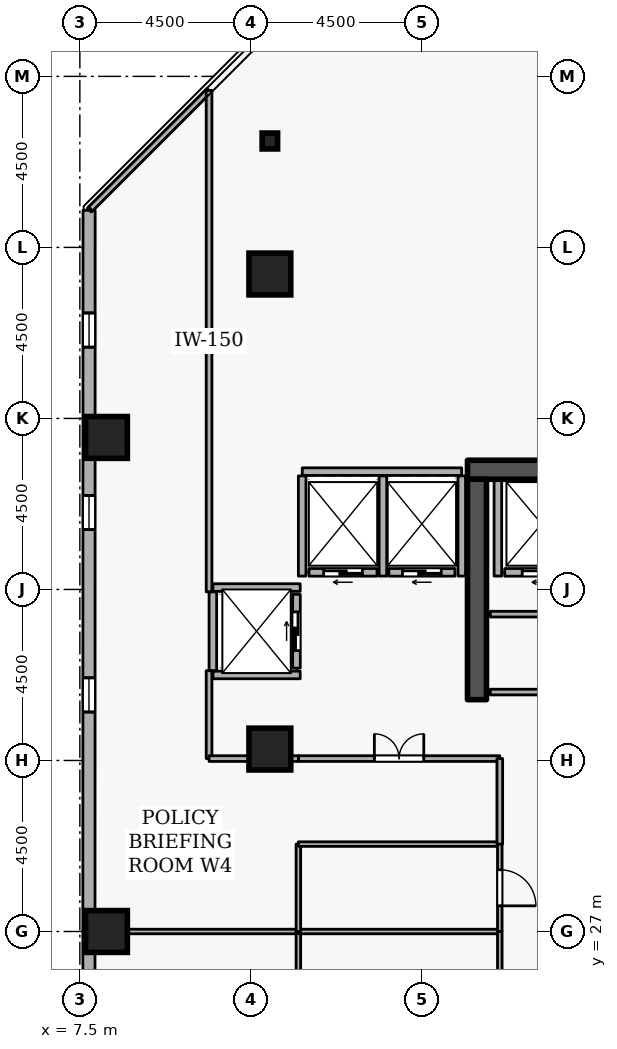
"""IFC4 building model, lengths in metres.
Left out: names, types, materials, properties, quantities, classifications, styles, units other than length and angle.
Written with IfcOpenShell. Run it as: python <this file> out.ifc"""

import sys

from ifc_helpers import new_model, si_unit, direction, frame, frame_2d, origin, origin_2d, place, context, subcontext, project, spatial, rectangle, i_section, extrude, element, fill, save


model = new_model("IFC4")
c1 = context("Model", 3, precision=1e-05, world=origin(), true_north=direction((0.0, 1.0)))
c2 = subcontext(c1, "Body", "Model", "MODEL_VIEW")
j1 = project(units=[si_unit("LENGTHUNIT", "METRE"), si_unit("PLANEANGLEUNIT", "RADIAN")], contexts=[c1])
p1 = place(None, origin())
s1 = spatial("IfcSite", under=j1, at=p1, CompositionType="ELEMENT")
p2 = place(p1, origin())
s2 = spatial("IfcBuilding", under=s1, at=p2, CompositionType="ELEMENT")
p3 = place(p2, frame((0.0, 0.0, 192.9)))
s3 = spatial("IfcBuildingStorey", under=s2, at=p3, CompositionType="ELEMENT", Elevation=192.9)
p4 = place(p3, frame((17.7, 39.15, 0.0), z_axis=(0.0, 0.0, 1.0), x_axis=(1.0, 0.0, 0.0)))
e1 = element("IfcWall", 1, at=p4, inside=s3, PredefinedType="SHEAR", context=c2, shape_type="SweptSolid", body=[
    extrude(rectangle(XDim=15.6, YDim=0.5, at=frame_2d((7.8, 0.0))), origin(), (0.0, 0.0, 1.0), 3.6),
])
p5 = place(p3, frame((17.95, 33.1, 0.0), z_axis=(0.0, 0.0, 1.0), x_axis=(0.0, 1.0, 0.0)))
e2 = element("IfcWall", 2, at=p5, inside=s3, PredefinedType="SHEAR", context=c2, shape_type="SweptSolid", body=[
    extrude(rectangle(XDim=5.8, YDim=0.5, at=frame_2d((2.9, 0.0))), origin(), (0.0, 0.0, 1.0), 3.6),
])
for number, where, z_axis, x_axis in (
    (3, (12.5, 44.3, 0.0), (0.0, 0.0, 1.0), (1.0, 0.0, 0.0)),
    (4, (8.2, 27.0, 0.0), (0.0, 0.0, 1.0), (1.0, 0.0, 0.0)),
    (5, (8.2, 40.0, 0.0), (0.0, 0.0, 1.0), (1.0, 0.0, 0.0)),
    (6, (12.5, 31.8, 0.0), (0.0, 0.0, 1.0), (1.0, 0.0, 0.0)),
):
    element("IfcColumn", number, at=place(p3, frame(where, z_axis=z_axis, x_axis=x_axis)), inside=s3, PredefinedType="COLUMN", context=c2, shape_type="SweptSolid", body=[
        extrude(rectangle(XDim=1.1, YDim=1.1, at=origin_2d()), origin(), (0.0, 0.0, 1.0), 3.6),
    ])
p6 = place(p3, frame((12.5, 47.8, 0.0), z_axis=(0.0, 0.0, 1.0), x_axis=(1.0, 0.0, 0.0)))
e7 = element("IfcColumn", 7, at=p6, inside=s3, PredefinedType="COLUMN", context=c2, shape_type="SweptSolid", body=[
    extrude(i_section(OverallWidth=0.407, OverallDepth=0.419, WebThickness=0.031, FlangeThickness=0.049, FilletRadius=0.015, at=origin_2d()), origin(), (0.0, 0.0, 1.0), 3.6),
])
p7 = place(p3, frame((7.743, 45.975, 0.0), z_axis=(0.0, 0.0, 1.0), x_axis=(-0.000214431216, -0.99999997701, 0.0)))
e8 = element("IfcWall", 8, at=p7, inside=s3, PredefinedType="STANDARD", context=c2, shape_type="SweptSolid", body=[
    extrude(rectangle(XDim=34.156, YDim=0.32, at=frame_2d((17.078, 0.0))), origin(), (0.0, 0.0, 1.0), 2.7),
])
p8 = place(p7, frame((2.7, 0.0, 0.72)))
e9 = element("IfcOpeningElement", 9, at=p8, cuts=e8, PredefinedType="OPENING", context=c2, shape_type="SweptSolid", body=[
    extrude(rectangle(XDim=0.9, YDim=1.75, at=frame_2d((0.45, 0.875))), frame((0.0, 0.17, 0.0), z_axis=(0.0, -1.0, 0.0), x_axis=(1.0, 0.0, 0.0)), (0.0, 0.0, 1.0), 0.34),
])
p9 = place(p7, frame((7.5, 0.0, 0.72)))
e10 = element("IfcOpeningElement", 10, at=p9, cuts=e8, PredefinedType="OPENING", context=c2, shape_type="SweptSolid", body=[
    extrude(rectangle(XDim=0.9, YDim=1.75, at=frame_2d((0.45, 0.875))), frame((0.0, 0.17, 0.0), z_axis=(0.0, -1.0, 0.0), x_axis=(1.0, 0.0, 0.0)), (0.0, 0.0, 1.0), 0.34),
])
p10 = place(p7, frame((12.3, 0.0, 0.72)))
e11 = element("IfcOpeningElement", 11, at=p10, cuts=e8, PredefinedType="OPENING", context=c2, shape_type="SweptSolid", body=[
    extrude(rectangle(XDim=0.9, YDim=1.75, at=frame_2d((0.45, 0.875))), frame((0.0, 0.17, 0.0), z_axis=(0.0, -1.0, 0.0), x_axis=(1.0, 0.0, 0.0)), (0.0, 0.0, 1.0), 0.34),
])
p11 = place(p7, frame((21.9, 0.0, 0.72)))
e12 = element("IfcOpeningElement", 12, at=p11, cuts=e8, PredefinedType="OPENING", context=c2, shape_type="SweptSolid", body=[
    extrude(rectangle(XDim=0.9, YDim=1.75, at=frame_2d((0.45, 0.875))), frame((0.0, 0.17, 0.0), z_axis=(0.0, -1.0, 0.0), x_axis=(1.0, 0.0, 0.0)), (0.0, 0.0, 1.0), 0.34),
])
p12 = place(p7, frame((26.7, 0.0, 0.72)))
e13 = element("IfcOpeningElement", 13, at=p12, cuts=e8, PredefinedType="OPENING", context=c2, shape_type="SweptSolid", body=[
    extrude(rectangle(XDim=0.9, YDim=1.75, at=frame_2d((0.45, 0.875))), frame((0.0, 0.17, 0.0), z_axis=(0.0, -1.0, 0.0), x_axis=(1.0, 0.0, 0.0)), (0.0, 0.0, 1.0), 0.34),
])
p13 = place(p3, frame((20.62, 36.45, 0.0), z_axis=(0.0, 0.0, 1.0), x_axis=(-1.0, 0.0, 0.0)))
e14 = element("IfcWall", 14, at=p13, inside=s3, PredefinedType="STANDARD", context=c2, shape_type="SweptSolid", body=[
    extrude(rectangle(XDim=1.94, YDim=0.2, at=frame_2d((0.97, 0.0))), origin(), (0.0, 0.0, 1.0), 3.34),
])
p14 = place(p13, frame((0.46, 0.0, 0.0)))
e15 = element("IfcOpeningElement", 15, at=p14, cuts=e14, PredefinedType="OPENING", context=c2, shape_type="SweptSolid", body=[
    extrude(rectangle(XDim=1.02, YDim=2.06, at=frame_2d((0.51, 1.03))), frame((0.0, 0.11, 0.0), z_axis=(0.0, -1.0, 0.0), x_axis=(1.0, 0.0, 0.0)), (0.0, 0.0, 1.0), 0.22),
])
p15 = place(p3, frame((17.37, 36.45, 0.0), z_axis=(0.0, 0.0, 1.0), x_axis=(-1.0, 0.0, 0.0)))
e16 = element("IfcWall", 16, at=p15, inside=s3, PredefinedType="STANDARD", context=c2, shape_type="SweptSolid", body=[
    extrude(rectangle(XDim=1.74, YDim=0.2, at=frame_2d((0.87, 0.0))), origin(), (0.0, 0.0, 1.0), 3.34),
])
p16 = place(p15, frame((0.36, 0.0, 0.0)))
e17 = element("IfcOpeningElement", 17, at=p16, cuts=e16, PredefinedType="OPENING", context=c2, shape_type="SweptSolid", body=[
    extrude(rectangle(XDim=1.02, YDim=2.06, at=frame_2d((0.51, 1.03))), frame((0.0, 0.11, 0.0), z_axis=(0.0, -1.0, 0.0), x_axis=(1.0, 0.0, 0.0)), (0.0, 0.0, 1.0), 0.22),
])
p17 = place(p3, frame((15.32, 36.45, 0.0), z_axis=(0.0, 0.0, 1.0), x_axis=(-1.0, 0.0, 0.0)))
e18 = element("IfcWall", 18, at=p17, inside=s3, PredefinedType="STANDARD", context=c2, shape_type="SweptSolid", body=[
    extrude(rectangle(XDim=1.79, YDim=0.2, at=frame_2d((0.895, 0.0))), origin(), (0.0, 0.0, 1.0), 3.34),
])
p18 = place(p17, frame((0.385, 0.0, 0.0)))
e19 = element("IfcOpeningElement", 19, at=p18, cuts=e18, PredefinedType="OPENING", context=c2, shape_type="SweptSolid", body=[
    extrude(rectangle(XDim=1.02, YDim=2.06, at=frame_2d((0.51, 1.03))), frame((0.0, 0.11, 0.0), z_axis=(0.0, -1.0, 0.0), x_axis=(1.0, 0.0, 0.0)), (0.0, 0.0, 1.0), 0.22),
])
p19 = place(p3, frame((13.2, 33.93, 0.0), z_axis=(0.0, 0.0, 1.0), x_axis=(0.0, 1.0, 0.0)))
e20 = element("IfcWall", 20, at=p19, inside=s3, PredefinedType="STANDARD", context=c2, shape_type="SweptSolid", body=[
    extrude(rectangle(XDim=1.94, YDim=0.2, at=frame_2d((0.97, 0.0))), origin(), (0.0, 0.0, 1.0), 3.34),
])
p20 = place(p19, frame((0.46, 0.0, 0.0)))
e21 = element("IfcOpeningElement", 21, at=p20, cuts=e20, PredefinedType="OPENING", context=c2, shape_type="SweptSolid", body=[
    extrude(rectangle(XDim=1.02, YDim=2.06, at=frame_2d((0.51, 1.03))), frame((0.0, 0.11, 0.0), z_axis=(0.0, -1.0, 0.0), x_axis=(1.0, 0.0, 0.0)), (0.0, 0.0, 1.0), 0.22),
])
p21 = place(p3, frame((18.5, 36.352, 0.0), z_axis=(0.0, 0.0, 1.0), x_axis=(0.0, 1.0, 0.0)))
e22 = element("IfcWall", 22, at=p21, inside=s3, PredefinedType="STANDARD", context=c2, shape_type="SweptSolid", body=[
    extrude(rectangle(XDim=2.536, YDim=0.2, at=frame_2d((1.268, 0.0))), origin(), (0.0, 0.0, 1.0), 3.34),
])
p22 = place(p3, frame((13.352, 39.1, 0.0), z_axis=(0.0, 0.0, 1.0), x_axis=(1.0, 0.0, 0.0)))
e23 = element("IfcWall", 23, at=p22, inside=s3, PredefinedType="STANDARD", context=c2, shape_type="SweptSolid", body=[
    extrude(rectangle(XDim=4.196, YDim=0.2, at=frame_2d((2.098, 0.0))), origin(), (0.0, 0.0, 1.0), 3.34),
])
p23 = place(p3, frame((17.55, 36.352, 0.0), z_axis=(0.0, 0.0, 1.0), x_axis=(0.0, 1.0, 0.0)))
e24 = element("IfcWall", 24, at=p23, inside=s3, PredefinedType="STANDARD", context=c2, shape_type="SweptSolid", body=[
    extrude(rectangle(XDim=2.636, YDim=0.2, at=frame_2d((1.318, 0.0))), origin(), (0.0, 0.0, 1.0), 2.545),
])
for number, where, z_axis, x_axis in (
    (25, (15.475, 36.352, 0.0), (0.0, 0.0, 1.0), (0.0, 1.0, 0.0)),
    (26, (13.35, 36.352, 0.0), (0.0, 0.0, 1.0), (0.0, 1.0, 0.0)),
):
    element("IfcWall", number, at=place(p3, frame(where, z_axis=z_axis, x_axis=x_axis)), inside=s3, PredefinedType="STANDARD", context=c2, shape_type="SweptSolid", body=[
        extrude(rectangle(XDim=2.636, YDim=0.2, at=frame_2d((1.318, 0.0))), origin(), (0.0, 0.0, 1.0), 3.34),
    ])
for number, where, z_axis, x_axis in (
    (27, (11.002, 36.05, 0.0), (0.0, 0.0, 1.0), (1.0, 0.0, 0.0)),
    (28, (11.002, 33.75, 0.0), (0.0, 0.0, 1.0), (1.0, 0.0, 0.0)),
):
    element("IfcWall", number, at=place(p3, frame(where, z_axis=z_axis, x_axis=x_axis)), inside=s3, PredefinedType="STANDARD", context=c2, shape_type="SweptSolid", body=[
        extrude(rectangle(XDim=2.296, YDim=0.2, at=frame_2d((1.148, 0.0))), origin(), (0.0, 0.0, 1.0), 3.34),
    ])
p24 = place(p3, frame((11.0, 33.862, 0.0), z_axis=(0.0, 0.0, 1.0), x_axis=(0.0, 1.0, 0.0)))
e29 = element("IfcWall", 29, at=p24, inside=s3, PredefinedType="STANDARD", context=c2, shape_type="SweptSolid", body=[
    extrude(rectangle(XDim=2.076, YDim=0.2, at=frame_2d((1.038, 0.0))), origin(), (0.0, 0.0, 1.0), 3.34),
])
p25 = place(p3, frame((18.3, 35.35, 0.0), z_axis=(0.0, 0.0, 1.0), x_axis=(1.0, 0.0, 0.0)))
e30 = element("IfcWall", 30, at=p25, inside=s3, PredefinedType="PARTITIONING", context=c2, shape_type="SweptSolid", body=[
    extrude(rectangle(XDim=4.25, YDim=0.15, at=frame_2d((2.125, 0.0))), origin(), (0.0, 0.0, 1.0), 3.34),
])
p26 = place(p3, frame((22.55, 33.3, 0.0), z_axis=(0.0, 0.0, 1.0), x_axis=(-1.0, 0.0, 0.0)))
e31 = element("IfcWall", 31, at=p26, inside=s3, PredefinedType="PARTITIONING", context=c2, shape_type="SweptSolid", body=[
    extrude(rectangle(XDim=4.25, YDim=0.15, at=frame_2d((2.125, 0.0))), origin(), (0.0, 0.0, 1.0), 3.34),
])
p27 = place(p26, frame((1.665, 0.0, 0.0)))
e32 = element("IfcOpeningElement", 32, at=p27, cuts=e31, PredefinedType="OPENING", context=c2, shape_type="SweptSolid", body=[
    extrude(rectangle(XDim=0.92, YDim=2.08, at=frame_2d((0.46, 1.04))), frame((0.0, 0.085, 0.0), z_axis=(0.0, -1.0, 0.0), x_axis=(1.0, 0.0, 0.0)), (0.0, 0.0, 1.0), 0.17),
])
p28 = place(p3, frame((8.2, 27.0, 0.0), z_axis=(0.0, 0.0, 1.0), x_axis=(1.0, 0.0, 0.0)))
e33 = element("IfcWall", 33, at=p28, inside=s3, PredefinedType="PARTITIONING", context=c2, shape_type="SweptSolid", body=[
    extrude(rectangle(XDim=5.05, YDim=0.12, at=frame_2d((2.525, 0.0))), origin(), (0.0, 0.0, 1.0), 2.882),
])
p29 = place(p3, frame((13.25, 27.0, 0.0), z_axis=(0.0, 0.0, 1.0), x_axis=(0.0, -1.0, 0.0)))
e34 = element("IfcWall", 34, at=p29, inside=s3, PredefinedType="PARTITIONING", context=c2, shape_type="SweptSolid", body=[
    extrude(rectangle(XDim=4.55, YDim=0.12, at=frame_2d((2.275, 0.0))), origin(), (0.0, 0.0, 1.0), 3.34),
])
p30 = place(p3, frame((13.25, 27.0, 0.0), z_axis=(0.0, 0.0, 1.0), x_axis=(1.0, 0.0, 0.0)))
e35 = element("IfcWall", 35, at=p30, inside=s3, PredefinedType="PARTITIONING", context=c2, shape_type="SweptSolid", body=[
    extrude(rectangle(XDim=5.3, YDim=0.12, at=frame_2d((2.65, 0.0))), origin(), (0.0, 0.0, 1.0), 2.882),
])
p31 = place(p3, frame((18.55, 27.0, 0.0), z_axis=(0.0, 0.0, 1.0), x_axis=(0.0, -1.0, 0.0)))
e36 = element("IfcWall", 36, at=p31, inside=s3, PredefinedType="PARTITIONING", context=c2, shape_type="SweptSolid", body=[
    extrude(rectangle(XDim=4.55, YDim=0.12, at=frame_2d((2.275, 0.0))), origin(), (0.0, 0.0, 1.0), 3.34),
])
p32 = place(p3, frame((13.25, 27.0, 0.0), z_axis=(0.0, 0.0, 1.0), x_axis=(0.0, 1.0, 0.0)))
e37 = element("IfcWall", 37, at=p32, inside=s3, PredefinedType="PARTITIONING", context=c2, shape_type="SweptSolid", body=[
    extrude(rectangle(XDim=2.3, YDim=0.12, at=frame_2d((1.15, 0.0))), origin(), (0.0, 0.0, 1.0), 3.34),
])
p33 = place(p3, frame((13.25, 29.3, 0.0), z_axis=(0.0, 0.0, 1.0), x_axis=(1.0, 0.0, 0.0)))
e38 = element("IfcWall", 38, at=p33, inside=s3, PredefinedType="PARTITIONING", context=c2, shape_type="SweptSolid", body=[
    extrude(rectangle(XDim=5.3, YDim=0.12, at=frame_2d((2.65, 0.0))), origin(), (0.0, 0.0, 1.0), 3.34),
])
p34 = place(p3, frame((18.55, 29.3, 0.0), z_axis=(0.0, 0.0, 1.0), x_axis=(0.0, -1.0, 0.0)))
e39 = element("IfcWall", 39, at=p34, inside=s3, PredefinedType="PARTITIONING", context=c2, shape_type="SweptSolid", body=[
    extrude(rectangle(XDim=2.3, YDim=0.12, at=frame_2d((1.15, 0.0))), origin(), (0.0, 0.0, 1.0), 3.34),
])
p35 = place(p34, frame((0.675, 0.0, 0.0)))
e40 = element("IfcOpeningElement", 40, at=p35, cuts=e39, PredefinedType="OPENING", context=c2, shape_type="SweptSolid", body=[
    extrude(rectangle(XDim=0.95, YDim=2.1, at=frame_2d((0.475, 1.05))), frame((0.0, 0.07, 0.0), z_axis=(0.0, -1.0, 0.0), x_axis=(1.0, 0.0, 0.0)), (0.0, 0.0, 1.0), 0.14),
])
p36 = place(p3, frame((13.25, 31.55, 0.0), z_axis=(0.0, 0.0, 1.0), x_axis=(1.0, 0.0, 0.0)))
e41 = element("IfcWall", 41, at=p36, inside=s3, PredefinedType="PARTITIONING", context=c2, shape_type="SweptSolid", body=[
    extrude(rectangle(XDim=5.3, YDim=0.15, at=frame_2d((2.65, 0.0))), origin(), (0.0, 0.0, 1.0), 3.34),
])
p37 = place(p36, frame((2.0, 0.0, 0.0)))
e42 = element("IfcOpeningElement", 42, at=p37, cuts=e41, PredefinedType="OPENING", context=c2, shape_type="SweptSolid", body=[
    extrude(rectangle(XDim=1.3, YDim=2.12, at=frame_2d((0.65, 1.06))), frame((0.0, 0.085, 0.0), z_axis=(0.0, -1.0, 0.0), x_axis=(1.0, 0.0, 0.0)), (0.0, 0.0, 1.0), 0.17),
])
p38 = place(p3, frame((18.55, 31.55, 0.0), z_axis=(0.0, 0.0, 1.0), x_axis=(0.0, -1.0, 0.0)))
e43 = element("IfcWall", 43, at=p38, inside=s3, PredefinedType="PARTITIONING", context=c2, shape_type="SweptSolid", body=[
    extrude(rectangle(XDim=2.25, YDim=0.15, at=frame_2d((1.125, 0.0))), origin(), (0.0, 0.0, 1.0), 3.34),
])
p39 = place(p3, frame((7.78, 46.01, 0.0), z_axis=(0.0, 0.0, 1.0), x_axis=(0.707106781187, 0.707106781187, 0.0)))
e44 = element("IfcWall", 44, at=p39, inside=s3, PredefinedType="PARTITIONING", context=c2, shape_type="SweptSolid", body=[
    extrude(rectangle(XDim=4.412, YDim=0.15, at=frame_2d((2.206, 0.0))), origin(), (0.0, 0.0, 1.0), 3.34),
])
p40 = place(p3, frame((10.9, 49.13, 0.0), z_axis=(0.0, 0.0, 1.0), x_axis=(0.0, -1.0, 0.0)))
e45 = element("IfcWall", 45, at=p40, inside=s3, PredefinedType="PARTITIONING", context=c2, shape_type="SweptSolid", body=[
    extrude(rectangle(XDim=13.192, YDim=0.15, at=frame_2d((6.596, 0.0))), origin(), (0.0, 0.0, 1.0), 3.34),
])
p41 = place(p3, frame((10.9, 33.862, 0.0), z_axis=(0.0, 0.0, 1.0), x_axis=(0.0, -1.0, 0.0)))
e46 = element("IfcWall", 46, at=p41, inside=s3, PredefinedType="PARTITIONING", context=c2, shape_type="SweptSolid", body=[
    extrude(rectangle(XDim=2.312, YDim=0.15, at=frame_2d((1.156, 0.0))), origin(), (0.0, 0.0, 1.0), 3.34),
])
p42 = place(p3, frame((10.9, 31.55, 0.0), z_axis=(0.0, 0.0, 1.0), x_axis=(1.0, 0.0, 0.0)))
e47 = element("IfcWall", 47, at=p42, inside=s3, PredefinedType="PARTITIONING", context=c2, shape_type="SweptSolid", body=[
    extrude(rectangle(XDim=2.35, YDim=0.15, at=frame_2d((1.175, 0.0))), origin(), (0.0, 0.0, 1.0), 3.34),
])
p43 = place(p8, origin())
e48 = element("IfcWindow", 48, at=p43, inside=s3, PartitioningType="SINGLE_PANEL", PredefinedType="WINDOW", context=c2, shape_type="SweptSolid", body=[
    extrude(rectangle(XDim=0.9, YDim=1.75, at=frame_2d((0.45, 0.875))), frame((0.0, 0.03, 0.0), z_axis=(0.0, -1.0, 0.0), x_axis=(1.0, 0.0, 0.0)), (0.0, 0.0, 1.0), 0.06),
])
fill(e9, e48)
p44 = place(p9, origin())
e49 = element("IfcWindow", 49, at=p44, inside=s3, PartitioningType="SINGLE_PANEL", PredefinedType="WINDOW", context=c2, shape_type="SweptSolid", body=[
    extrude(rectangle(XDim=0.9, YDim=1.75, at=frame_2d((0.45, 0.875))), frame((0.0, 0.03, 0.0), z_axis=(0.0, -1.0, 0.0), x_axis=(1.0, 0.0, 0.0)), (0.0, 0.0, 1.0), 0.06),
])
fill(e10, e49)
p45 = place(p10, origin())
e50 = element("IfcWindow", 50, at=p45, inside=s3, PartitioningType="SINGLE_PANEL", PredefinedType="WINDOW", context=c2, shape_type="SweptSolid", body=[
    extrude(rectangle(XDim=0.9, YDim=1.75, at=frame_2d((0.45, 0.875))), frame((0.0, 0.03, 0.0), z_axis=(0.0, -1.0, 0.0), x_axis=(1.0, 0.0, 0.0)), (0.0, 0.0, 1.0), 0.06),
])
fill(e11, e50)
p46 = place(p14, origin())
e51 = element("IfcDoor", 51, at=p46, inside=s3, OperationType="SLIDING_TO_LEFT", PredefinedType="DOOR", context=c2, shape_type="SweptSolid", body=[
    extrude(rectangle(XDim=1.02, YDim=2.06, at=frame_2d((0.51, 1.03))), frame((0.0, 0.025, 0.0), z_axis=(0.0, -1.0, 0.0), x_axis=(1.0, 0.0, 0.0)), (0.0, 0.0, 1.0), 0.05),
])
fill(e15, e51)
p47 = place(p16, origin())
e52 = element("IfcDoor", 52, at=p47, inside=s3, OperationType="SLIDING_TO_LEFT", PredefinedType="DOOR", context=c2, shape_type="SweptSolid", body=[
    extrude(rectangle(XDim=1.02, YDim=2.06, at=frame_2d((0.51, 1.03))), frame((0.0, 0.025, 0.0), z_axis=(0.0, -1.0, 0.0), x_axis=(1.0, 0.0, 0.0)), (0.0, 0.0, 1.0), 0.05),
])
fill(e17, e52)
p48 = place(p18, origin())
e53 = element("IfcDoor", 53, at=p48, inside=s3, OperationType="SLIDING_TO_LEFT", PredefinedType="DOOR", context=c2, shape_type="SweptSolid", body=[
    extrude(rectangle(XDim=1.02, YDim=2.06, at=frame_2d((0.51, 1.03))), frame((0.0, 0.025, 0.0), z_axis=(0.0, -1.0, 0.0), x_axis=(1.0, 0.0, 0.0)), (0.0, 0.0, 1.0), 0.05),
])
fill(e19, e53)
p49 = place(p20, origin())
e54 = element("IfcDoor", 54, at=p49, inside=s3, OperationType="SLIDING_TO_LEFT", PredefinedType="DOOR", context=c2, shape_type="SweptSolid", body=[
    extrude(rectangle(XDim=1.02, YDim=2.06, at=frame_2d((0.51, 1.03))), frame((0.0, 0.025, 0.0), z_axis=(0.0, -1.0, 0.0), x_axis=(1.0, 0.0, 0.0)), (0.0, 0.0, 1.0), 0.05),
])
fill(e21, e54)
p50 = place(p35, origin())
e55 = element("IfcDoor", 55, at=p50, inside=s3, OperationType="SINGLE_SWING_RIGHT", PredefinedType="DOOR", context=c2, shape_type="SweptSolid", body=[
    extrude(rectangle(XDim=0.95, YDim=2.1, at=frame_2d((0.475, 1.05))), frame((0.0, 0.025, 0.0), z_axis=(0.0, -1.0, 0.0), x_axis=(1.0, 0.0, 0.0)), (0.0, 0.0, 1.0), 0.05),
])
fill(e40, e55)
p51 = place(p37, origin())
e56 = element("IfcDoor", 56, at=p51, inside=s3, OperationType="DOUBLE_DOOR_SINGLE_SWING", PredefinedType="DOOR", context=c2, shape_type="SweptSolid", body=[
    extrude(rectangle(XDim=1.3, YDim=2.12, at=frame_2d((0.65, 1.06))), frame((0.0, 0.025, 0.0), z_axis=(0.0, -1.0, 0.0), x_axis=(1.0, 0.0, 0.0)), (0.0, 0.0, 1.0), 0.05),
])
fill(e42, e56)
save(model, sys.argv[1])
